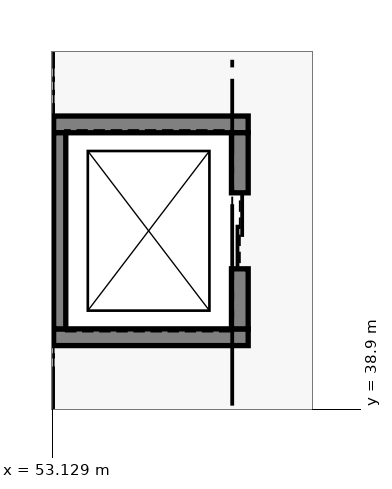
"""IFC4 building model, lengths in metres.
Left out: names, types, materials, properties, quantities, classifications, styles, units other than length and angle.
Written with IfcOpenShell. Run it as: python <this file> out.ifc"""

import sys

from ifc_helpers import new_model, si_unit, direction, frame, frame_2d, origin, place, context, subcontext, project, spatial, rectangle, extrude, element, fill, save


model = new_model("IFC4")
c1 = context("Model", 3, precision=1e-05, world=origin(), true_north=direction((0.0, 1.0)))
c2 = subcontext(c1, "Body", "Model", "MODEL_VIEW")
j1 = project(units=[si_unit("LENGTHUNIT", "METRE"), si_unit("PLANEANGLEUNIT", "RADIAN")], contexts=[c1])
p1 = place(None, origin())
s1 = spatial("IfcSite", under=j1, at=p1, CompositionType="ELEMENT")
p2 = place(p1, origin())
s2 = spatial("IfcBuilding", under=s1, at=p2, CompositionType="ELEMENT")
p3 = place(p2, origin())
s3 = spatial("IfcBuildingStorey", under=s2, at=p3, CompositionType="ELEMENT", Elevation=0.0)
for number, where, z_axis, x_axis in (
    (1, (53.09, 39.85, 0.0), (0.0, 0.0, 1.0), (1.0, 0.0, 0.0)),
    (2, (53.09, 42.65, 0.0), (0.0, 0.0, 1.0), (1.0, 0.0, 0.0)),
):
    element("IfcWall", number, at=place(p3, frame(where, z_axis=z_axis, x_axis=x_axis)), inside=s3, PredefinedType="SOLIDWALL", context=c2, shape_type="SweptSolid", body=[
        extrude(rectangle(XDim=2.62, YDim=0.22, at=frame_2d((1.31, 0.0))), origin(), (0.0, 0.0, 1.0), 4.5),
    ])
p4 = place(p3, frame((53.2, 39.96, 0.0), z_axis=(0.0, 0.0, 1.0), x_axis=(0.0, 1.0, 0.0)))
e3 = element("IfcWall", 3, at=p4, inside=s3, PredefinedType="SOLIDWALL", context=c2, shape_type="SweptSolid", body=[
    extrude(rectangle(XDim=2.58, YDim=0.22, at=frame_2d((1.29, 0.0))), origin(), (0.0, 0.0, 1.0), 4.5),
])
p5 = place(p3, frame((55.6, 39.96, 0.0), z_axis=(0.0, 0.0, 1.0), x_axis=(0.0, 1.0, 0.0)))
e4 = element("IfcWall", 4, at=p5, inside=s3, PredefinedType="SOLIDWALL", context=c2, shape_type="SweptSolid", body=[
    extrude(rectangle(XDim=2.58, YDim=0.22, at=frame_2d((1.29, 0.0))), origin(), (0.0, 0.0, 1.0), 4.5),
])
p6 = place(p5, frame((0.79, 0.0, 0.0)))
e5 = element("IfcOpeningElement", 5, at=p6, cuts=e4, PredefinedType="OPENING", context=c2, shape_type="SweptSolid", body=[
    extrude(rectangle(XDim=1.0, YDim=2.15, at=frame_2d((0.5, 1.075))), frame((0.0, 0.12, 0.0), z_axis=(0.0, -1.0, 0.0), x_axis=(1.0, 0.0, 0.0)), (0.0, 0.0, 1.0), 0.24),
])
p7 = place(p6, origin())
e6 = element("IfcDoor", 6, at=p7, inside=s3, OperationType="SLIDING_TO_LEFT", PredefinedType="DOOR", context=c2, shape_type="SweptSolid", body=[
    extrude(rectangle(XDim=1.0, YDim=2.15, at=frame_2d((0.5, 1.075))), frame((0.0, 0.025, 0.0), z_axis=(0.0, -1.0, 0.0), x_axis=(1.0, 0.0, 0.0)), (0.0, 0.0, 1.0), 0.05),
])
fill(e5, e6)
save(model, sys.argv[1])
